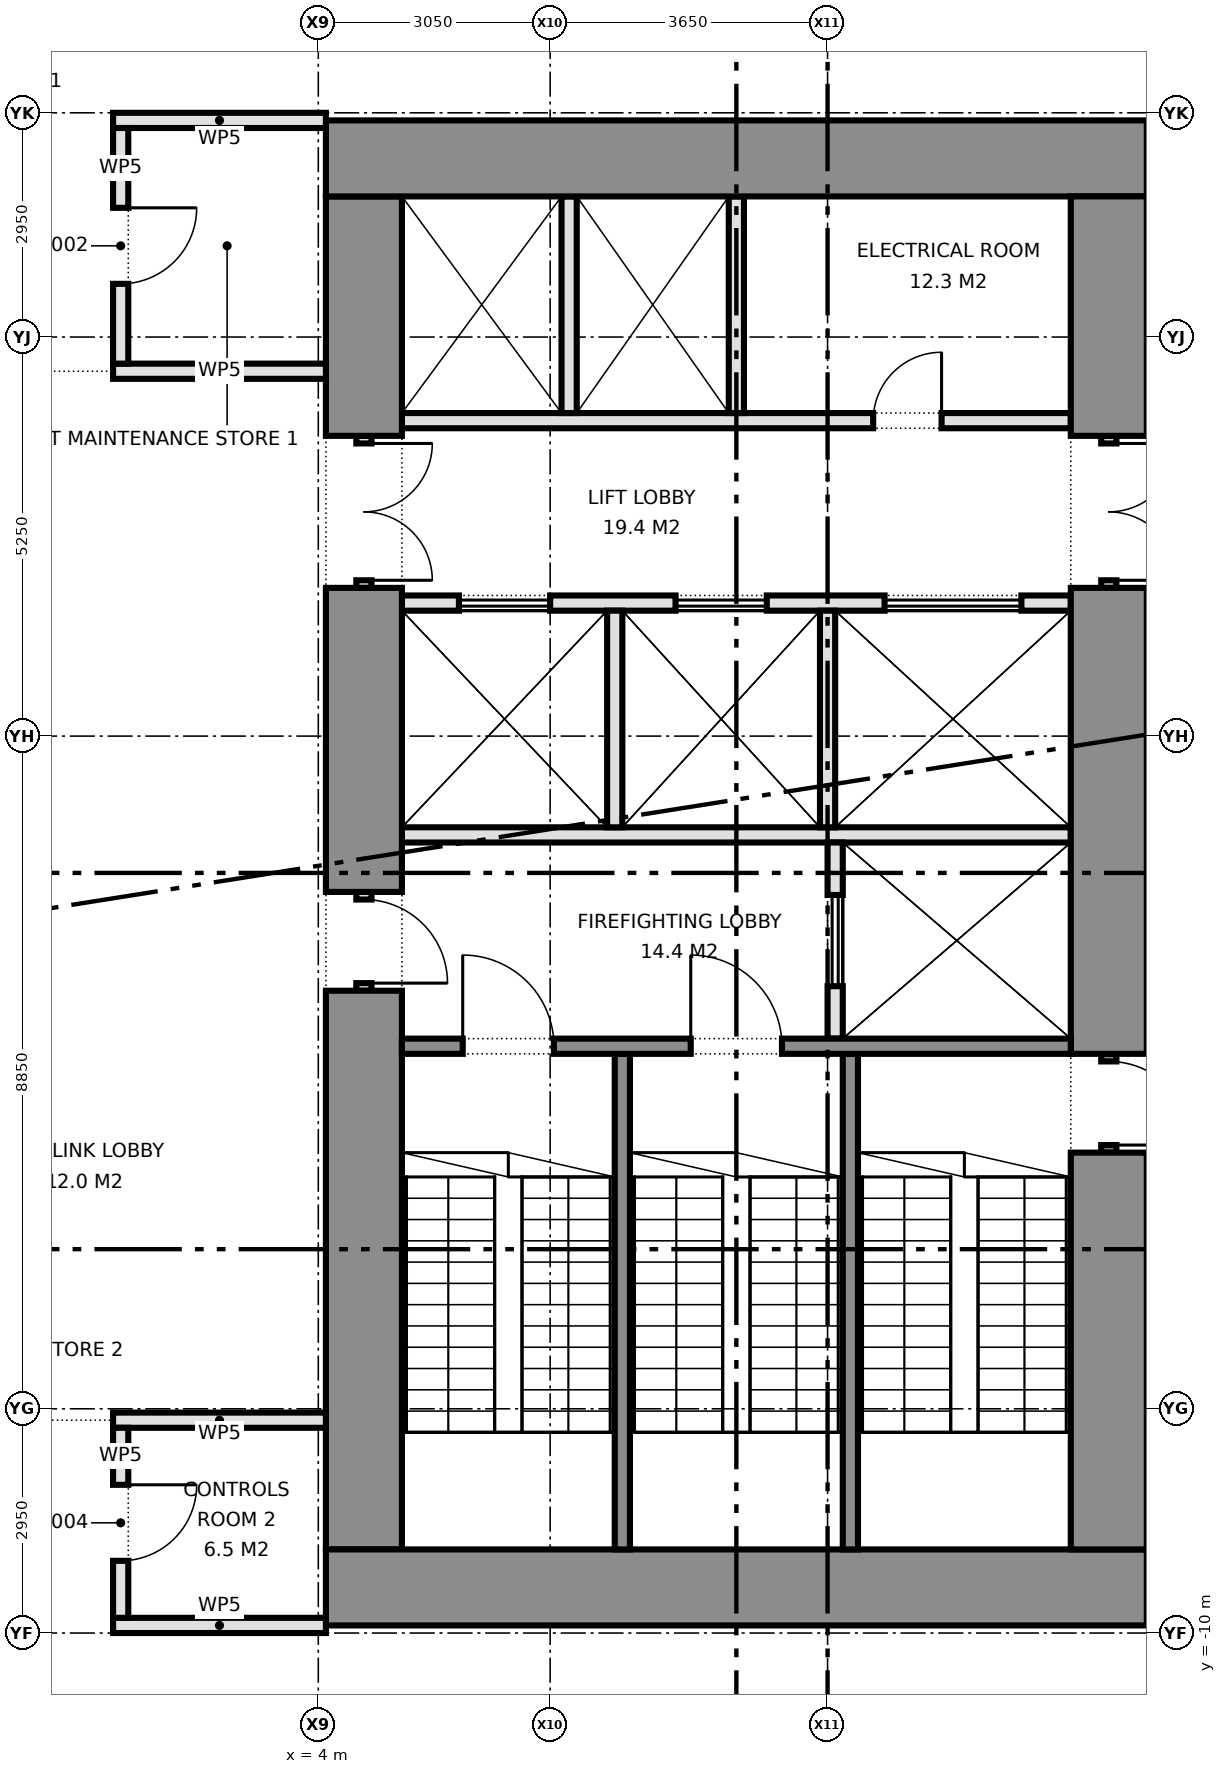
"""IFC4 building model, lengths in metres.
Left out: names, types, materials, properties, quantities, classifications, styles, units other than length and angle.
Written with IfcOpenShell. Run it as: python <this file> out.ifc"""

import sys

from ifc_helpers import new_model, si_unit, direction, frame, frame_2d, origin, place, context, subcontext, project, spatial, rectangle, extrude, element, fill, save


model = new_model("IFC4")
c1 = context("Model", 3, precision=1e-05, world=origin(), true_north=direction((0.0, 1.0)))
c2 = subcontext(c1, "Body", "Model", "MODEL_VIEW")
j1 = project(units=[si_unit("LENGTHUNIT", "METRE"), si_unit("PLANEANGLEUNIT", "RADIAN")], contexts=[c1])
p1 = place(None, origin())
s1 = spatial("IfcSite", under=j1, at=p1, CompositionType="ELEMENT")
p2 = place(p1, origin())
s2 = spatial("IfcBuilding", under=s1, at=p2, CompositionType="ELEMENT")
p3 = place(p2, frame((0.0, 0.0, 120.4)))
s3 = spatial("IfcBuildingStorey", under=s2, at=p3, CompositionType="ELEMENT", Elevation=120.4)
for number, where, z_axis, x_axis in (
    (1, (14.9, 9.4, 0.0), (0.0, 0.0, 1.0), (-1.0, 0.0, 0.0)),
    (2, (14.9, -9.4, 0.0), (0.0, 0.0, 1.0), (-1.0, 0.0, 0.0)),
):
    element("IfcWall", number, at=place(p3, frame(where, z_axis=z_axis, x_axis=x_axis)), inside=s3, PredefinedType="SHEAR", context=c2, shape_type="SweptSolid", body=[
        extrude(rectangle(XDim=10.8, YDim=1.0, at=frame_2d((5.4, 0.0))), origin(), (0.0, 0.0, 1.0), 4.34),
    ])
p4 = place(p3, frame((14.4, 8.9, 0.0), z_axis=(0.0, 0.0, 1.0), x_axis=(0.0, -1.0, 0.0)))
e3 = element("IfcWall", 3, at=p4, inside=s3, PredefinedType="SHEAR", context=c2, shape_type="SweptSolid", body=[
    extrude(rectangle(XDim=3.15, YDim=1.0, at=frame_2d((1.575, 0.0))), origin(), (0.0, 0.0, 1.0), 4.34),
])
p5 = place(p3, frame((14.4, 5.75, 0.0), z_axis=(0.0, 0.0, 1.0), x_axis=(0.0, -1.0, 0.0)))
e4 = element("IfcWall", 4, at=p5, inside=s3, PredefinedType="PARTITIONING", context=c2, shape_type="SweptSolid", body=[
    extrude(rectangle(XDim=2.0, YDim=0.2, at=frame_2d((1.0, 0.0))), origin(), (0.0, 0.0, 1.0), 2.4),
])
p6 = place(p5, frame((0.1, 0.0, 0.0)))
e5 = element("IfcOpeningElement", 5, at=p6, cuts=e4, PredefinedType="OPENING", context=c2, shape_type="SweptSolid", body=[
    extrude(rectangle(XDim=1.8, YDim=2.1, at=frame_2d((0.9, 1.05))), frame((0.0, 0.11, 0.0), z_axis=(0.0, -1.0, 0.0), x_axis=(1.0, 0.0, 0.0)), (0.0, 0.0, 1.0), 0.22),
])
p7 = place(p3, frame((14.4, 3.75, 0.0), z_axis=(0.0, 0.0, 1.0), x_axis=(0.0, -1.0, 0.0)))
e6 = element("IfcWall", 6, at=p7, inside=s3, PredefinedType="SHEAR", context=c2, shape_type="SweptSolid", body=[
    extrude(rectangle(XDim=6.13, YDim=1.0, at=frame_2d((3.065, 0.0))), origin(), (0.0, 0.0, 1.0), 4.34),
])
p8 = place(p3, frame((14.4, -2.38, 0.0), z_axis=(0.0, 0.0, 1.0), x_axis=(0.0, -1.0, 0.0)))
e7 = element("IfcWall", 7, at=p8, inside=s3, PredefinedType="SHEAR", context=c2, shape_type="SweptSolid", body=[
    extrude(rectangle(XDim=1.3, YDim=0.2, at=frame_2d((0.65, 0.0))), origin(), (0.0, 0.0, 1.0), 2.4),
])
p9 = place(p8, frame((0.1, 0.0, 0.0)))
e8 = element("IfcOpeningElement", 8, at=p9, cuts=e7, PredefinedType="OPENING", context=c2, shape_type="SweptSolid", body=[
    extrude(rectangle(XDim=1.1, YDim=2.1, at=frame_2d((0.55, 1.05))), frame((0.0, 0.11, 0.0), z_axis=(0.0, -1.0, 0.0), x_axis=(1.0, 0.0, 0.0)), (0.0, 0.0, 1.0), 0.22),
])
p10 = place(p3, frame((14.4, -3.68, 0.0), z_axis=(0.0, 0.0, 1.0), x_axis=(0.0, -1.0, 0.0)))
e9 = element("IfcWall", 9, at=p10, inside=s3, PredefinedType="SHEAR", context=c2, shape_type="SweptSolid", body=[
    extrude(rectangle(XDim=5.22, YDim=1.0, at=frame_2d((2.61, 0.0))), origin(), (0.0, 0.0, 1.0), 4.34),
])
p11 = place(p3, frame((4.6, 8.9, 0.0), z_axis=(0.0, 0.0, 1.0), x_axis=(0.0, -1.0, 0.0)))
e10 = element("IfcWall", 10, at=p11, inside=s3, PredefinedType="SHEAR", context=c2, shape_type="SweptSolid", body=[
    extrude(rectangle(XDim=3.15, YDim=1.0, at=frame_2d((1.575, 0.0))), origin(), (0.0, 0.0, 1.0), 4.34),
])
p12 = place(p3, frame((4.6, 5.75, 0.0), z_axis=(0.0, 0.0, 1.0), x_axis=(0.0, -1.0, 0.0)))
e11 = element("IfcWall", 11, at=p12, inside=s3, PredefinedType="PARTITIONING", context=c2, shape_type="SweptSolid", body=[
    extrude(rectangle(XDim=2.0, YDim=0.2, at=frame_2d((1.0, 0.0))), origin(), (0.0, 0.0, 1.0), 2.4),
])
p13 = place(p12, frame((0.1, 0.0, 0.0)))
e12 = element("IfcOpeningElement", 12, at=p13, cuts=e11, PredefinedType="OPENING", context=c2, shape_type="SweptSolid", body=[
    extrude(rectangle(XDim=1.8, YDim=2.1, at=frame_2d((0.9, 1.05))), frame((0.0, 0.11, 0.0), z_axis=(0.0, -1.0, 0.0), x_axis=(1.0, 0.0, 0.0)), (0.0, 0.0, 1.0), 0.22),
])
p14 = place(p3, frame((4.6, 3.75, 0.0), z_axis=(0.0, 0.0, 1.0), x_axis=(0.0, -1.0, 0.0)))
e13 = element("IfcWall", 13, at=p14, inside=s3, PredefinedType="SHEAR", context=c2, shape_type="SweptSolid", body=[
    extrude(rectangle(XDim=4.0, YDim=1.0, at=frame_2d((2.0, 0.0))), origin(), (0.0, 0.0, 1.0), 4.34),
])
p15 = place(p3, frame((4.6, -0.25, 0.0), z_axis=(0.0, 0.0, 1.0), x_axis=(0.0, -1.0, 0.0)))
e14 = element("IfcWall", 14, at=p15, inside=s3, PredefinedType="PARTITIONING", context=c2, shape_type="SweptSolid", body=[
    extrude(rectangle(XDim=1.3, YDim=0.2, at=frame_2d((0.65, 0.0))), origin(), (0.0, 0.0, 1.0), 2.4),
])
p16 = place(p15, frame((0.1, 0.0, 0.0)))
e15 = element("IfcOpeningElement", 15, at=p16, cuts=e14, PredefinedType="OPENING", context=c2, shape_type="SweptSolid", body=[
    extrude(rectangle(XDim=1.1, YDim=2.1, at=frame_2d((0.55, 1.05))), frame((0.0, 0.11, 0.0), z_axis=(0.0, -1.0, 0.0), x_axis=(1.0, 0.0, 0.0)), (0.0, 0.0, 1.0), 0.22),
])
p17 = place(p3, frame((4.6, -1.55, 0.0), z_axis=(0.0, 0.0, 1.0), x_axis=(0.0, -1.0, 0.0)))
e16 = element("IfcWall", 16, at=p17, inside=s3, PredefinedType="SHEAR", context=c2, shape_type="SweptSolid", body=[
    extrude(rectangle(XDim=7.35, YDim=1.0, at=frame_2d((3.675, 0.0))), origin(), (0.0, 0.0, 1.0), 4.34),
])
p18 = place(p3, frame((13.9, 5.95, 0.0), z_axis=(0.0, 0.0, 1.0), x_axis=(-1.0, 0.0, 0.0)))
e17 = element("IfcWall", 17, at=p18, inside=s3, PredefinedType="PARTITIONING", context=c2, shape_type="SweptSolid", body=[
    extrude(rectangle(XDim=8.8, YDim=0.2, at=frame_2d((4.4, 0.0))), origin(), (0.0, 0.0, 1.0), 4.34),
])
p19 = place(p18, frame((1.7, 0.0, 0.0)))
e18 = element("IfcOpeningElement", 18, at=p19, cuts=e17, PredefinedType="OPENING", context=c2, shape_type="SweptSolid", body=[
    extrude(rectangle(XDim=0.9, YDim=2.1, at=frame_2d((0.45, 1.05))), frame((0.0, 0.11, 0.0), z_axis=(0.0, -1.0, 0.0), x_axis=(1.0, 0.0, 0.0)), (0.0, 0.0, 1.0), 0.22),
])
p20 = place(p3, frame((13.9, 3.55, 0.0), z_axis=(0.0, 0.0, 1.0), x_axis=(-1.0, 0.0, 0.0)))
e19 = element("IfcWall", 19, at=p20, inside=s3, PredefinedType="PARTITIONING", context=c2, shape_type="SweptSolid", body=[
    extrude(rectangle(XDim=8.8, YDim=0.2, at=frame_2d((4.4, 0.0))), origin(), (0.0, 0.0, 1.0), 4.34),
])
p21 = place(p20, frame((0.65, 0.0, 0.0)))
e20 = element("IfcOpeningElement", 20, at=p21, cuts=e19, PredefinedType="OPENING", context=c2, shape_type="SweptSolid", body=[
    extrude(rectangle(XDim=1.8, YDim=2.1, at=frame_2d((0.9, 1.05))), frame((0.0, 0.11, 0.0), z_axis=(0.0, -1.0, 0.0), x_axis=(1.0, 0.0, 0.0)), (0.0, 0.0, 1.0), 0.22),
])
p22 = place(p20, frame((4.0, 0.0, 0.0)))
e21 = element("IfcOpeningElement", 21, at=p22, cuts=e19, PredefinedType="OPENING", context=c2, shape_type="SweptSolid", body=[
    extrude(rectangle(XDim=1.2, YDim=2.1, at=frame_2d((0.6, 1.05))), frame((0.0, 0.11, 0.0), z_axis=(0.0, -1.0, 0.0), x_axis=(1.0, 0.0, 0.0)), (0.0, 0.0, 1.0), 0.22),
])
p23 = place(p20, frame((6.85, 0.0, 0.0)))
e22 = element("IfcOpeningElement", 22, at=p23, cuts=e19, PredefinedType="OPENING", context=c2, shape_type="SweptSolid", body=[
    extrude(rectangle(XDim=1.2, YDim=2.1, at=frame_2d((0.6, 1.05))), frame((0.0, 0.11, 0.0), z_axis=(0.0, -1.0, 0.0), x_axis=(1.0, 0.0, 0.0)), (0.0, 0.0, 1.0), 0.22),
])
p24 = place(p3, frame((13.9, 0.5, 0.0), z_axis=(0.0, 0.0, 1.0), x_axis=(-1.0, 0.0, 0.0)))
e23 = element("IfcWall", 23, at=p24, inside=s3, PredefinedType="PARTITIONING", context=c2, shape_type="SweptSolid", body=[
    extrude(rectangle(XDim=8.8, YDim=0.2, at=frame_2d((4.4, 0.0))), origin(), (0.0, 0.0, 1.0), 4.34),
])
p25 = place(p3, frame((10.8, 0.4, 0.0), z_axis=(0.0, 0.0, 1.0), x_axis=(0.0, -1.0, 0.0)))
e24 = element("IfcWall", 24, at=p25, inside=s3, PredefinedType="PARTITIONING", context=c2, shape_type="SweptSolid", body=[
    extrude(rectangle(XDim=2.58, YDim=0.2, at=frame_2d((1.29, 0.0))), origin(), (0.0, 0.0, 1.0), 4.34),
])
p26 = place(p25, frame((0.69, 0.0, 0.0)))
e25 = element("IfcOpeningElement", 25, at=p26, cuts=e24, PredefinedType="OPENING", context=c2, shape_type="SweptSolid", body=[
    extrude(rectangle(XDim=1.2, YDim=2.1, at=frame_2d((0.6, 1.05))), frame((0.0, 0.11, 0.0), z_axis=(0.0, -1.0, 0.0), x_axis=(1.0, 0.0, 0.0)), (0.0, 0.0, 1.0), 0.22),
])
p27 = place(p3, frame((13.9, -2.28, 0.0), z_axis=(0.0, 0.0, 1.0), x_axis=(-1.0, 0.0, 0.0)))
e26 = element("IfcWall", 26, at=p27, inside=s3, PredefinedType="SHEAR", context=c2, shape_type="SweptSolid", body=[
    extrude(rectangle(XDim=8.8, YDim=0.2, at=frame_2d((4.4, 0.0))), origin(), (0.0, 0.0, 1.0), 4.34),
])
p28 = place(p27, frame((3.8, 0.0, 0.0)))
e27 = element("IfcOpeningElement", 27, at=p28, cuts=e26, PredefinedType="OPENING", context=c2, shape_type="SweptSolid", body=[
    extrude(rectangle(XDim=1.2, YDim=2.1, at=frame_2d((0.6, 1.05))), frame((0.0, 0.11, 0.0), z_axis=(0.0, -1.0, 0.0), x_axis=(1.0, 0.0, 0.0)), (0.0, 0.0, 1.0), 0.22),
])
p29 = place(p27, frame((6.8, 0.0, 0.0)))
e28 = element("IfcOpeningElement", 28, at=p29, cuts=e26, PredefinedType="OPENING", context=c2, shape_type="SweptSolid", body=[
    extrude(rectangle(XDim=1.2, YDim=2.1, at=frame_2d((0.6, 1.05))), frame((0.0, 0.11, 0.0), z_axis=(0.0, -1.0, 0.0), x_axis=(1.0, 0.0, 0.0)), (0.0, 0.0, 1.0), 0.22),
])
for number, where, z_axis, x_axis in (
    (29, (11.0, -2.38, 0.0), (0.0, 0.0, 1.0), (0.0, -1.0, 0.0)),
    (30, (8.0, -2.38, 0.0), (0.0, 0.0, 1.0), (0.0, -1.0, 0.0)),
):
    element("IfcWall", number, at=place(p3, frame(where, z_axis=z_axis, x_axis=x_axis)), inside=s3, PredefinedType="SHEAR", context=c2, shape_type="SweptSolid", body=[
        extrude(rectangle(XDim=6.52, YDim=0.2, at=frame_2d((3.26, 0.0))), origin(), (0.0, 0.0, 1.0), 4.34),
    ])
for number, where, z_axis, x_axis in (
    (31, (9.5, 8.9, 0.0), (0.0, 0.0, 1.0), (0.0, -1.0, 0.0)),
    (32, (7.3, 8.9, 0.0), (0.0, 0.0, 1.0), (0.0, -1.0, 0.0)),
    (33, (10.7, 3.45, 0.0), (0.0, 0.0, 1.0), (0.0, -1.0, 0.0)),
    (34, (7.9, 3.45, 0.0), (0.0, 0.0, 1.0), (0.0, -1.0, 0.0)),
):
    element("IfcWall", number, at=place(p3, frame(where, z_axis=z_axis, x_axis=x_axis)), inside=s3, PredefinedType="PARTITIONING", context=c2, shape_type="SweptSolid", body=[
        extrude(rectangle(XDim=2.85, YDim=0.2, at=frame_2d((1.425, 0.0))), origin(), (0.0, 0.0, 1.0), 4.34),
    ])
for number, where, z_axis, x_axis in (
    (35, (1.3, -9.9, 0.0), (0.0, 0.0, 1.0), (1.0, 0.0, 0.0)),
    (36, (1.3, -7.2, 0.0), (0.0, 0.0, 1.0), (1.0, 0.0, 0.0)),
    (37, (1.3, 6.6, 0.0), (0.0, 0.0, 1.0), (1.0, 0.0, 0.0)),
    (38, (1.3, 9.9, 0.0), (0.0, 0.0, 1.0), (1.0, 0.0, 0.0)),
):
    element("IfcWall", number, at=place(p3, frame(where, z_axis=z_axis, x_axis=x_axis)), inside=s3, PredefinedType="PARTITIONING", context=c2, shape_type="SweptSolid", body=[
        extrude(rectangle(XDim=2.8, YDim=0.2, at=frame_2d((1.4, 0.0))), origin(), (0.0, 0.0, 1.0), 4.34),
    ])
p30 = place(p3, frame((1.4, -9.8, 0.0), z_axis=(0.0, 0.0, 1.0), x_axis=(0.0, 1.0, 0.0)))
e39 = element("IfcWall", 39, at=p30, inside=s3, PredefinedType="PARTITIONING", context=c2, shape_type="SweptSolid", body=[
    extrude(rectangle(XDim=2.5, YDim=0.2, at=frame_2d((1.25, 0.0))), origin(), (0.0, 0.0, 1.0), 4.34),
])
p31 = place(p30, frame((0.75, 0.0, 0.0)))
e40 = element("IfcOpeningElement", 40, at=p31, cuts=e39, PredefinedType="OPENING", context=c2, shape_type="SweptSolid", body=[
    extrude(rectangle(XDim=1.0, YDim=2.1, at=frame_2d((0.5, 1.05))), frame((0.0, 0.11, 0.0), z_axis=(0.0, -1.0, 0.0), x_axis=(1.0, 0.0, 0.0)), (0.0, 0.0, 1.0), 0.22),
])
p32 = place(p3, frame((1.4, 6.7, 0.0), z_axis=(0.0, 0.0, 1.0), x_axis=(0.0, 1.0, 0.0)))
e41 = element("IfcWall", 41, at=p32, inside=s3, PredefinedType="PARTITIONING", context=c2, shape_type="SweptSolid", body=[
    extrude(rectangle(XDim=3.1, YDim=0.2, at=frame_2d((1.55, 0.0))), origin(), (0.0, 0.0, 1.0), 4.34),
])
p33 = place(p32, frame((1.05, 0.0, 0.0)))
e42 = element("IfcOpeningElement", 42, at=p33, cuts=e41, PredefinedType="OPENING", context=c2, shape_type="SweptSolid", body=[
    extrude(rectangle(XDim=1.0, YDim=2.1, at=frame_2d((0.5, 1.05))), frame((0.0, 0.11, 0.0), z_axis=(0.0, -1.0, 0.0), x_axis=(1.0, 0.0, 0.0)), (0.0, 0.0, 1.0), 0.22),
])
p34 = place(p6, origin())
e43 = element("IfcDoor", 43, at=p34, inside=s3, OperationType="DOUBLE_DOOR_SINGLE_SWING", PredefinedType="DOOR", context=c2, shape_type="SweptSolid", body=[
    extrude(rectangle(XDim=1.8, YDim=2.1, at=frame_2d((0.9, 1.05))), frame((0.0, 0.025, 0.0), z_axis=(0.0, -1.0, 0.0), x_axis=(1.0, 0.0, 0.0)), (0.0, 0.0, 1.0), 0.05),
])
fill(e5, e43)
p35 = place(p9, origin())
e44 = element("IfcDoor", 44, at=p35, inside=s3, OperationType="SINGLE_SWING_RIGHT", PredefinedType="DOOR", context=c2, shape_type="SweptSolid", body=[
    extrude(rectangle(XDim=1.1, YDim=2.1, at=frame_2d((0.55, 1.05))), frame((0.0, 0.025, 0.0), z_axis=(0.0, -1.0, 0.0), x_axis=(1.0, 0.0, 0.0)), (0.0, 0.0, 1.0), 0.05),
])
fill(e8, e44)
p36 = place(p13, origin())
e45 = element("IfcDoor", 45, at=p36, inside=s3, OperationType="DOUBLE_DOOR_SINGLE_SWING", PredefinedType="DOOR", context=c2, shape_type="SweptSolid", body=[
    extrude(rectangle(XDim=1.8, YDim=2.1, at=frame_2d((0.9, 1.05))), frame((0.0, 0.025, 0.0), z_axis=(0.0, -1.0, 0.0), x_axis=(1.0, 0.0, 0.0)), (0.0, 0.0, 1.0), 0.05),
])
fill(e12, e45)
p37 = place(p16, origin())
e46 = element("IfcDoor", 46, at=p37, inside=s3, OperationType="SINGLE_SWING_RIGHT", PredefinedType="DOOR", context=c2, shape_type="SweptSolid", body=[
    extrude(rectangle(XDim=1.1, YDim=2.1, at=frame_2d((0.55, 1.05))), frame((0.0, 0.025, 0.0), z_axis=(0.0, -1.0, 0.0), x_axis=(1.0, 0.0, 0.0)), (0.0, 0.0, 1.0), 0.05),
])
fill(e15, e46)
p38 = place(p21, origin())
e47 = element("IfcDoor", 47, at=p38, inside=s3, OperationType="DOUBLE_DOOR_SLIDING", PredefinedType="DOOR", context=c2, shape_type="SweptSolid", body=[
    extrude(rectangle(XDim=1.8, YDim=2.1, at=frame_2d((0.9, 1.05))), frame((0.0, 0.025, 0.0), z_axis=(0.0, -1.0, 0.0), x_axis=(1.0, 0.0, 0.0)), (0.0, 0.0, 1.0), 0.05),
])
fill(e20, e47)
p39 = place(p22, origin())
e48 = element("IfcDoor", 48, at=p39, inside=s3, OperationType="DOUBLE_DOOR_SLIDING", PredefinedType="DOOR", context=c2, shape_type="SweptSolid", body=[
    extrude(rectangle(XDim=1.2, YDim=2.1, at=frame_2d((0.6, 1.05))), frame((0.0, 0.025, 0.0), z_axis=(0.0, -1.0, 0.0), x_axis=(1.0, 0.0, 0.0)), (0.0, 0.0, 1.0), 0.05),
])
fill(e21, e48)
p40 = place(p23, origin())
e49 = element("IfcDoor", 49, at=p40, inside=s3, OperationType="DOUBLE_DOOR_SLIDING", PredefinedType="DOOR", context=c2, shape_type="SweptSolid", body=[
    extrude(rectangle(XDim=1.2, YDim=2.1, at=frame_2d((0.6, 1.05))), frame((0.0, 0.025, 0.0), z_axis=(0.0, -1.0, 0.0), x_axis=(1.0, 0.0, 0.0)), (0.0, 0.0, 1.0), 0.05),
])
fill(e22, e49)
p41 = place(p26, origin())
e50 = element("IfcDoor", 50, at=p41, inside=s3, OperationType="DOUBLE_DOOR_SLIDING", PredefinedType="DOOR", context=c2, shape_type="SweptSolid", body=[
    extrude(rectangle(XDim=1.2, YDim=2.1, at=frame_2d((0.6, 1.05))), frame((0.0, 0.025, 0.0), z_axis=(0.0, -1.0, 0.0), x_axis=(1.0, 0.0, 0.0)), (0.0, 0.0, 1.0), 0.05),
])
fill(e25, e50)
p42 = place(p19, frame((0.9, 0.0, 0.0), z_axis=(0.0, 0.0, 1.0), x_axis=(-1.0, 0.0, 0.0)))
e51 = element("IfcDoor", 51, at=p42, inside=s3, OperationType="SINGLE_SWING_RIGHT", PredefinedType="DOOR", context=c2, shape_type="SweptSolid", body=[
    extrude(rectangle(XDim=0.9, YDim=2.1, at=frame_2d((0.45, 1.05))), frame((0.0, 0.025, 0.0), z_axis=(0.0, -1.0, 0.0), x_axis=(1.0, 0.0, 0.0)), (0.0, 0.0, 1.0), 0.05),
])
fill(e18, e51)
p43 = place(p28, frame((1.2, 0.0, 0.0), z_axis=(0.0, 0.0, 1.0), x_axis=(-1.0, 0.0, 0.0)))
e52 = element("IfcDoor", 52, at=p43, inside=s3, OperationType="SINGLE_SWING_LEFT", PredefinedType="DOOR", context=c2, shape_type="SweptSolid", body=[
    extrude(rectangle(XDim=1.2, YDim=2.1, at=frame_2d((0.6, 1.05))), frame((0.0, 0.025, 0.0), z_axis=(0.0, -1.0, 0.0), x_axis=(1.0, 0.0, 0.0)), (0.0, 0.0, 1.0), 0.05),
])
fill(e27, e52)
p44 = place(p29, frame((1.2, 0.0, 0.0), z_axis=(0.0, 0.0, 1.0), x_axis=(-1.0, 0.0, 0.0)))
e53 = element("IfcDoor", 53, at=p44, inside=s3, OperationType="SINGLE_SWING_LEFT", PredefinedType="DOOR", context=c2, shape_type="SweptSolid", body=[
    extrude(rectangle(XDim=1.2, YDim=2.1, at=frame_2d((0.6, 1.05))), frame((0.0, 0.025, 0.0), z_axis=(0.0, -1.0, 0.0), x_axis=(1.0, 0.0, 0.0)), (0.0, 0.0, 1.0), 0.05),
])
fill(e28, e53)
p45 = place(p33, frame((1.0, 0.0, 0.0), z_axis=(0.0, 0.0, 1.0), x_axis=(-1.0, 0.0, 0.0)))
e54 = element("IfcDoor", 54, at=p45, inside=s3, OperationType="SINGLE_SWING_LEFT", PredefinedType="DOOR", context=c2, shape_type="SweptSolid", body=[
    extrude(rectangle(XDim=1.0, YDim=2.1, at=frame_2d((0.5, 1.05))), frame((0.0, 0.025, 0.0), z_axis=(0.0, -1.0, 0.0), x_axis=(1.0, 0.0, 0.0)), (0.0, 0.0, 1.0), 0.05),
])
fill(e42, e54)
p46 = place(p31, frame((1.0, 0.0, 0.0), z_axis=(0.0, 0.0, 1.0), x_axis=(-1.0, 0.0, 0.0)))
e55 = element("IfcDoor", 55, at=p46, inside=s3, OperationType="SINGLE_SWING_LEFT", PredefinedType="DOOR", context=c2, shape_type="SweptSolid", body=[
    extrude(rectangle(XDim=1.0, YDim=2.1, at=frame_2d((0.5, 1.05))), frame((0.0, 0.025, 0.0), z_axis=(0.0, -1.0, 0.0), x_axis=(1.0, 0.0, 0.0)), (0.0, 0.0, 1.0), 0.05),
])
fill(e40, e55)
save(model, sys.argv[1])
